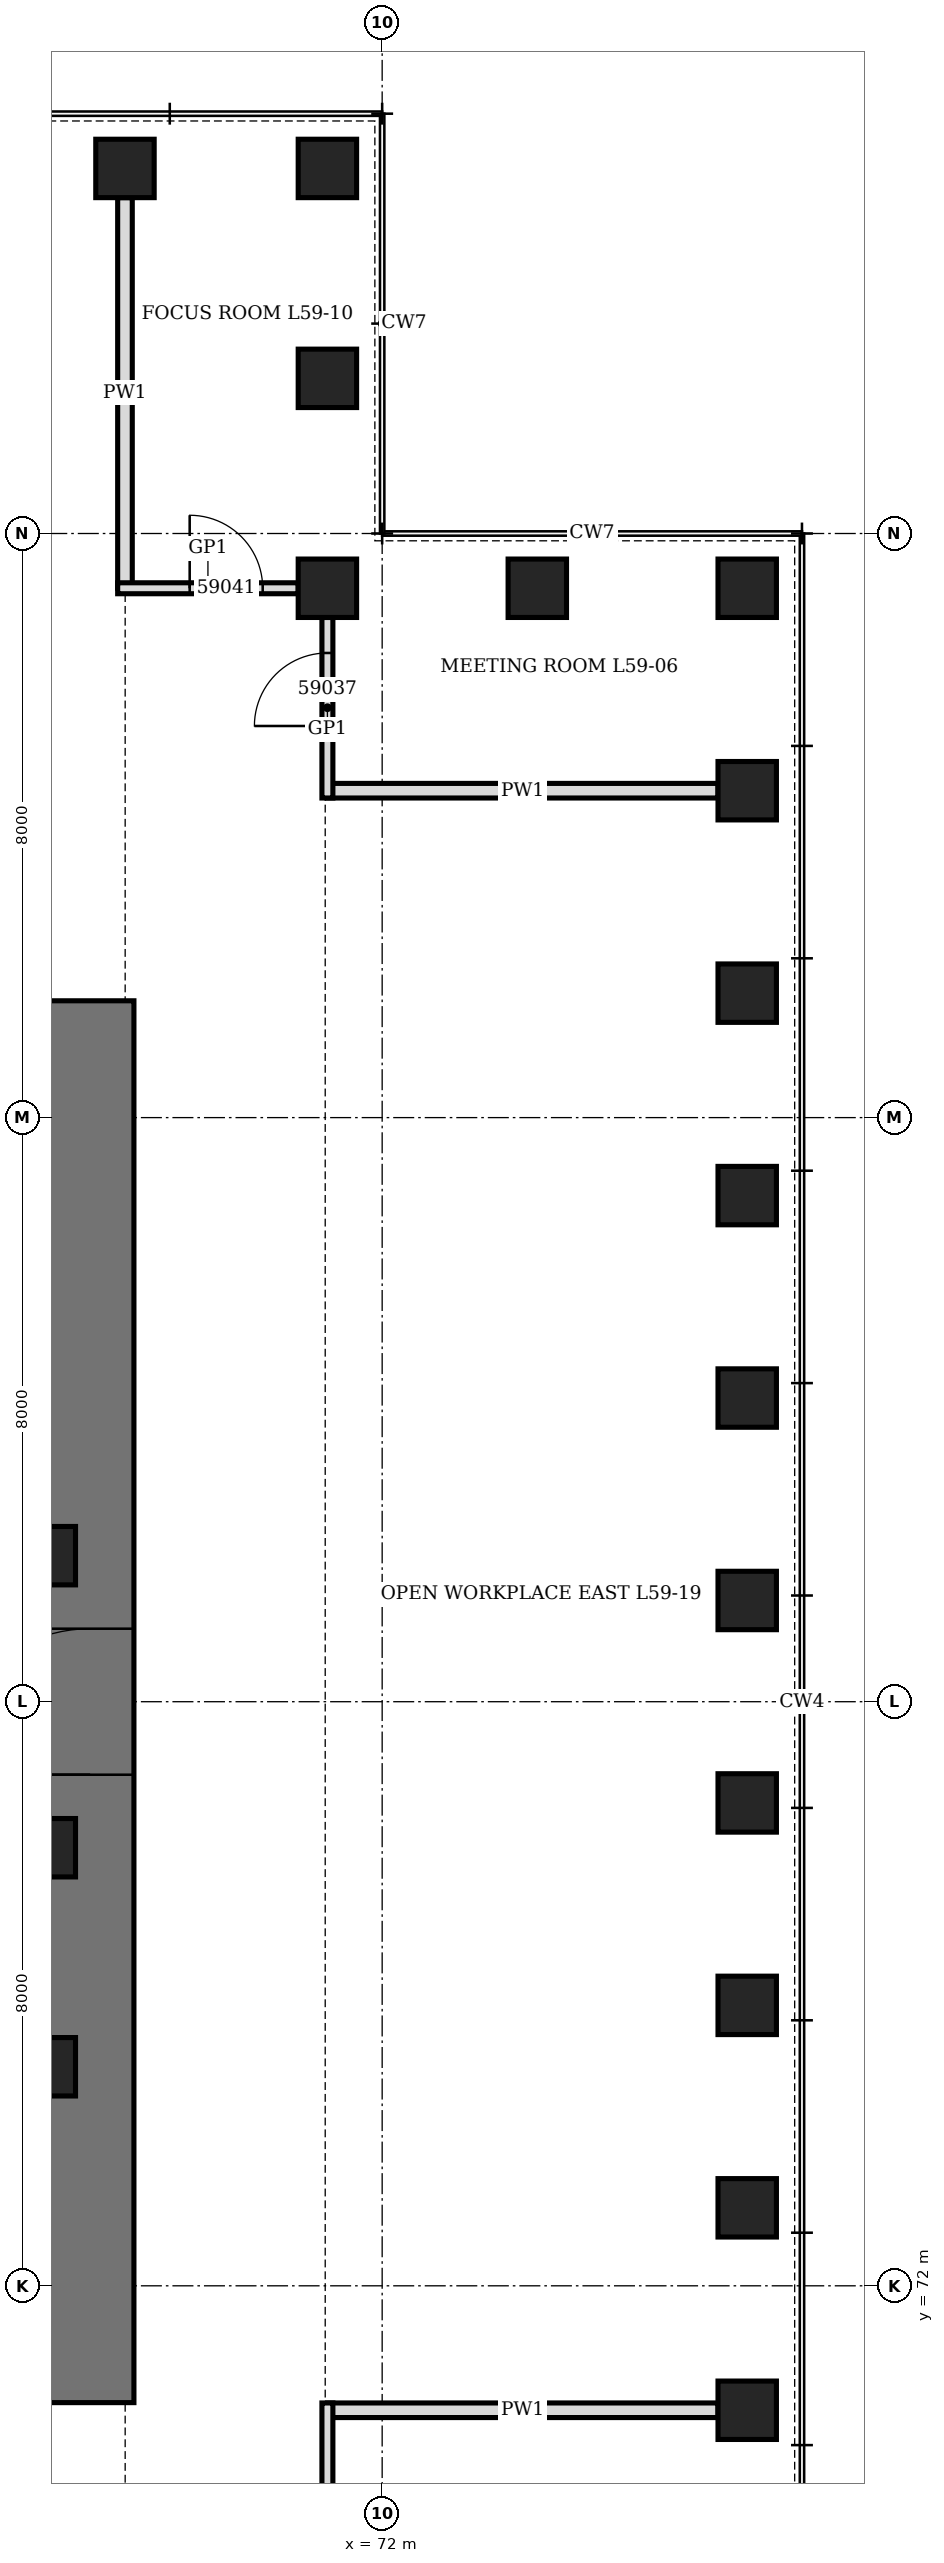
"""IFC4 building model, lengths in metres.
Left out: names, types, materials, properties, quantities, classifications, styles, units other than length and angle.
Written with IfcOpenShell. Run it as: python <this file> out.ifc"""

import sys

from ifc_helpers import new_model, si_unit, direction, frame, frame_2d, origin, origin_2d, place, context, subcontext, project, spatial, rectangle, hollow_rectangle, extrude, element, fill, save


model = new_model("IFC4")
c1 = context("Model", 3, precision=1e-05, world=origin(), true_north=direction((0.0, 1.0)))
c2 = subcontext(c1, "Body", "Model", "MODEL_VIEW")
j1 = project(units=[si_unit("LENGTHUNIT", "METRE"), si_unit("PLANEANGLEUNIT", "RADIAN")], contexts=[c1])
p1 = place(None, origin())
s1 = spatial("IfcSite", under=j1, at=p1, CompositionType="ELEMENT")
p2 = place(p1, origin())
s2 = spatial("IfcBuilding", under=s1, at=p2, CompositionType="ELEMENT")
p3 = place(p2, frame((0.0, 0.0, 262.9)))
s3 = spatial("IfcBuildingStorey", under=s2, at=p3, CompositionType="ELEMENT", Elevation=262.9)
for number, where, z_axis, x_axis in (
    (1, (77.0, 70.295, 0.0), (0.0, 0.0, 1.0), (0.0, 1.0, 0.0)),
    (2, (77.0, 73.068, 0.0), (0.0, 0.0, 1.0), (0.0, 1.0, 0.0)),
    (3, (77.0, 75.841, 0.0), (0.0, 0.0, 1.0), (0.0, 1.0, 0.0)),
    (4, (77.0, 78.614, 0.0), (0.0, 0.0, 1.0), (0.0, 1.0, 0.0)),
    (5, (77.0, 81.386, 0.0), (0.0, 0.0, 1.0), (0.0, 1.0, 0.0)),
    (6, (77.0, 84.159, 0.0), (0.0, 0.0, 1.0), (0.0, 1.0, 0.0)),
    (7, (77.0, 86.932, 0.0), (0.0, 0.0, 1.0), (0.0, 1.0, 0.0)),
    (8, (77.0, 89.705, 0.0), (0.0, 0.0, 1.0), (0.0, 1.0, 0.0)),
    (9, (77.0, 92.477, 0.0), (0.0, 0.0, 1.0), (0.0, 1.0, 0.0)),
    (10, (77.0, 95.25, 0.0), (0.0, 0.0, 1.0), (1.0, 0.0, 0.0)),
    (11, (74.125, 95.25, 0.0), (0.0, 0.0, 1.0), (1.0, 0.0, 0.0)),
    (12, (71.25, 95.25, 0.0), (0.0, 0.0, 1.0), (0.0, 1.0, 0.0)),
    (13, (71.25, 98.125, 0.0), (0.0, 0.0, 1.0), (0.0, 1.0, 0.0)),
    (14, (71.25, 101.0, 0.0), (0.0, 0.0, 1.0), (1.0, 0.0, 0.0)),
    (15, (68.477, 101.0, 0.0), (0.0, 0.0, 1.0), (1.0, 0.0, 0.0)),
):
    element("IfcColumn", number, at=place(p3, frame(where, z_axis=z_axis, x_axis=x_axis)), inside=s3, PredefinedType="COLUMN", context=c2, shape_type="SweptSolid", body=[
        extrude(hollow_rectangle(XDim=0.8, YDim=0.8, WallThickness=0.1, at=origin_2d()), origin(), (0.0, 0.0, 1.0), 4.2),
    ])
p4 = place(p3, frame((68.0, 70.4, 0.0), z_axis=(0.0, 0.0, 1.0), x_axis=(0.0, 1.0, 0.0)))
e16 = element("IfcWall", 16, at=p4, inside=s3, PredefinedType="SHEAR", context=c2, shape_type="SweptSolid", body=[
    extrude(rectangle(XDim=19.2, YDim=1.2, at=frame_2d((9.6, 0.0))), origin(), (0.0, 0.0, 1.0), 4.2),
])
p5 = place(p4, frame((8.6, 0.0, 0.0)))
e17 = element("IfcOpeningElement", 17, at=p5, cuts=e16, PredefinedType="OPENING", context=c2, shape_type="SweptSolid", body=[
    extrude(rectangle(XDim=2.0, YDim=2.4, at=frame_2d((1.0, 1.2))), frame((0.0, 0.61, 0.0), z_axis=(0.0, -1.0, 0.0), x_axis=(1.0, 0.0, 0.0)), (0.0, 0.0, 1.0), 1.22),
])
for number, where, z_axis, x_axis in (
    (18, (67.4, 75.0, 0.0), (0.0, 0.0, 1.0), (1.0, 0.0, 0.0)),
    (19, (67.4, 78.0, 0.0), (0.0, 0.0, 1.0), (1.0, 0.0, 0.0)),
    (20, (67.4, 82.0, 0.0), (0.0, 0.0, 1.0), (1.0, 0.0, 0.0)),
):
    element("IfcColumn", number, at=place(p3, frame(where, z_axis=z_axis, x_axis=x_axis)), inside=s3, PredefinedType="COLUMN", context=c2, shape_type="SweptSolid", body=[
        extrude(hollow_rectangle(XDim=0.8, YDim=0.8, WallThickness=0.1, at=origin_2d()), origin(), (0.0, 0.0, 1.0), 4.2),
    ])
for number, where, z_axis, x_axis in (
    (21, (71.25, 70.295, 0.0), (0.0, 0.0, 1.0), (1.0, 0.0, 0.0)),
    (22, (71.25, 92.477, 0.0), (0.0, 0.0, 1.0), (1.0, 0.0, 0.0)),
    (23, (68.477, 95.25, 0.0), (0.0, 0.0, 1.0), (0.0, 1.0, 0.0)),
):
    element("IfcWall", number, at=place(p3, frame(where, z_axis=z_axis, x_axis=x_axis)), inside=s3, PredefinedType="PARTITIONING", context=c2, shape_type="SweptSolid", body=[
        extrude(rectangle(XDim=5.35, YDim=0.2, at=frame_2d((2.675, 0.0))), origin(), (0.0, 0.0, 1.0), 3.428),
    ])
p6 = place(p3, frame((68.377, 95.25, 0.0), z_axis=(0.0, 0.0, 1.0), x_axis=(1.0, 0.0, 0.0)))
e24 = element("IfcWall", 24, at=p6, inside=s3, PredefinedType="PARTITIONING", context=c2, shape_type="SweptSolid", body=[
    extrude(rectangle(XDim=2.473, YDim=0.15, at=frame_2d((1.236, 0.0))), origin(), (0.0, 0.0, 1.0), 4.04),
])
p7 = place(p6, frame((0.986, 0.0, 0.0)))
e25 = element("IfcOpeningElement", 25, at=p7, cuts=e24, PredefinedType="OPENING", context=c2, shape_type="SweptSolid", body=[
    extrude(rectangle(XDim=1.0, YDim=2.4, at=frame_2d((0.5, 1.2))), frame((0.0, 0.085, 0.0), z_axis=(0.0, -1.0, 0.0), x_axis=(1.0, 0.0, 0.0)), (0.0, 0.0, 1.0), 0.17),
])
p8 = place(p3, frame((71.25, 65.15, 0.0), z_axis=(0.0, 0.0, 1.0), x_axis=(0.0, 1.0, 0.0)))
e26 = element("IfcWall", 26, at=p8, inside=s3, PredefinedType="PARTITIONING", context=c2, shape_type="SweptSolid", body=[
    extrude(rectangle(XDim=5.246, YDim=0.15, at=frame_2d((2.623, 0.0))), origin(), (0.0, 0.0, 1.0), 4.04),
])
p9 = place(p8, frame((0.486, 0.0, 0.0)))
e27 = element("IfcOpeningElement", 27, at=p9, cuts=e26, PredefinedType="OPENING", context=c2, shape_type="SweptSolid", body=[
    extrude(rectangle(XDim=1.0, YDim=2.1, at=frame_2d((0.5, 1.05))), frame((0.0, 0.085, 0.0), z_axis=(0.0, -1.0, 0.0), x_axis=(1.0, 0.0, 0.0)), (0.0, 0.0, 1.0), 0.17),
])
p10 = place(p3, frame((71.25, 92.377, 0.0), z_axis=(0.0, 0.0, 1.0), x_axis=(0.0, 1.0, 0.0)))
e28 = element("IfcWall", 28, at=p10, inside=s3, PredefinedType="PARTITIONING", context=c2, shape_type="SweptSolid", body=[
    extrude(rectangle(XDim=2.473, YDim=0.15, at=frame_2d((1.236, 0.0))), origin(), (0.0, 0.0, 1.0), 4.04),
])
p11 = place(p10, frame((0.986, 0.0, 0.0)))
e29 = element("IfcOpeningElement", 29, at=p11, cuts=e28, PredefinedType="OPENING", context=c2, shape_type="SweptSolid", body=[
    extrude(rectangle(XDim=1.0, YDim=2.4, at=frame_2d((0.5, 1.2))), frame((0.0, 0.085, 0.0), z_axis=(0.0, -1.0, 0.0), x_axis=(1.0, 0.0, 0.0)), (0.0, 0.0, 1.0), 0.17),
])
p12 = place(p5, origin())
e30 = element("IfcDoor", 30, at=p12, inside=s3, OperationType="DOUBLE_DOOR_SINGLE_SWING", PredefinedType="DOOR", context=c2, shape_type="SweptSolid", body=[
    extrude(rectangle(XDim=2.0, YDim=2.4, at=frame_2d((1.0, 1.2))), frame((0.0, 0.35, 0.0), z_axis=(0.0, -1.0, 0.0), x_axis=(1.0, 0.0, 0.0)), (0.0, 0.0, 1.0), 0.7),
])
fill(e17, e30)
p13 = place(p11, origin())
e31 = element("IfcDoor", 31, at=p13, inside=s3, OperationType="SINGLE_SWING_RIGHT", PredefinedType="DOOR", context=c2, shape_type="SweptSolid", body=[
    extrude(rectangle(XDim=1.0, YDim=2.4, at=frame_2d((0.5, 1.2))), frame((0.0, 0.075, 0.0), z_axis=(0.0, -1.0, 0.0), x_axis=(1.0, 0.0, 0.0)), (0.0, 0.0, 1.0), 0.149),
])
fill(e29, e31)
p14 = place(p7, origin())
e32 = element("IfcDoor", 32, at=p14, inside=s3, OperationType="SINGLE_SWING_RIGHT", PredefinedType="DOOR", context=c2, shape_type="SweptSolid", body=[
    extrude(rectangle(XDim=1.0, YDim=2.4, at=frame_2d((0.5, 1.2))), frame((0.0, 0.075, 0.0), z_axis=(0.0, -1.0, 0.0), x_axis=(1.0, 0.0, 0.0)), (0.0, 0.0, 1.0), 0.149),
])
fill(e25, e32)
save(model, sys.argv[1])
